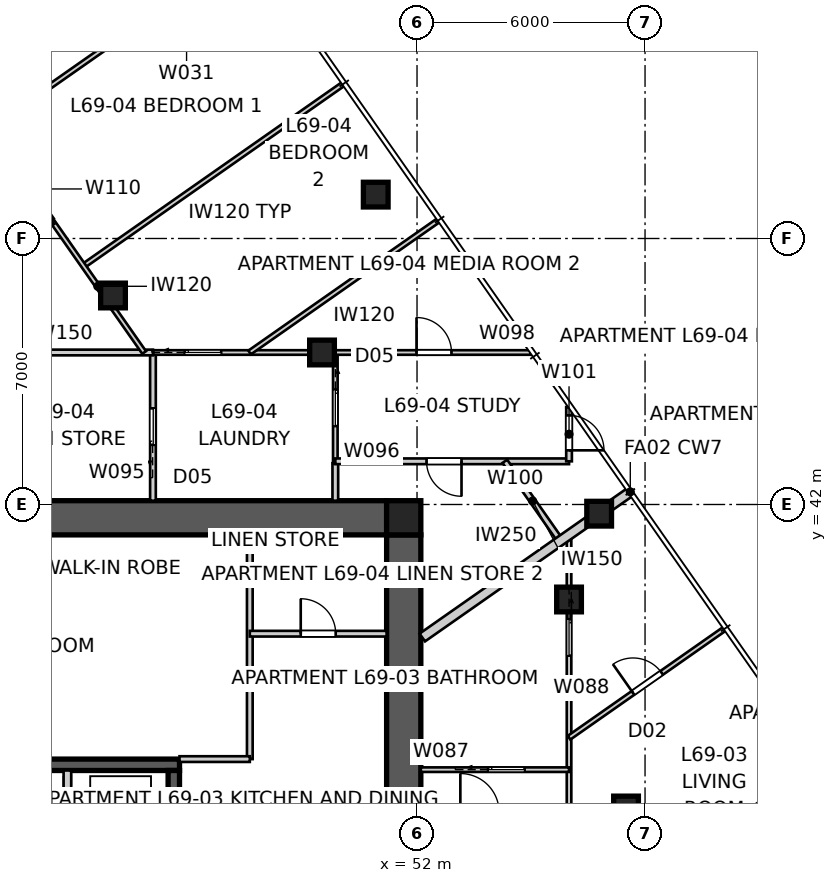
"""IFC4 building model, lengths in metres.
Left out: names, types, materials, properties, quantities, classifications, styles, units other than length and angle.
Written with IfcOpenShell. Run it as: python <this file> out.ifc"""

import sys

from ifc_helpers import new_model, si_unit, direction, frame, frame_2d, origin, origin_2d, place, context, subcontext, project, spatial, polyline, rectangle, outline, extrude, element, fill, save


model = new_model("IFC4")
c1 = context("Model", 3, precision=1e-05, world=origin(), true_north=direction((0.0, 1.0)))
c2 = subcontext(c1, "Body", "Model", "MODEL_VIEW")
j1 = project(units=[si_unit("LENGTHUNIT", "METRE"), si_unit("PLANEANGLEUNIT", "RADIAN")], contexts=[c1])
p1 = place(None, origin())
s1 = spatial("IfcSite", under=j1, at=p1, CompositionType="ELEMENT")
p2 = place(p1, origin())
s2 = spatial("IfcBuilding", under=s1, at=p2, CompositionType="ELEMENT")
p3 = place(p2, frame((0.0, 0.0, 250.6)))
s3 = spatial("IfcBuildingStorey", under=s2, at=p3, CompositionType="ELEMENT", Elevation=250.6)
p4 = place(p3, frame((28.8, 41.65, 0.0), z_axis=(0.0, 0.0, 1.0), x_axis=(1.0, 0.0, 0.0)))
e1 = element("IfcWall", 1, at=p4, inside=s3, PredefinedType="SHEAR", context=c2, shape_type="SweptSolid", body=[
    extrude(outline(polyline([(0.0, -0.45), (22.4, -0.45), (22.4, -0.025), (22.85, -0.025), (22.85, 0.025), (22.4, 0.025), (22.4, 0.45), (0.0, 0.45), (0.0, 0.025), (-0.45, 0.025), (-0.45, -0.025), (0.0, -0.025), (0.0, -0.45)])), origin(), (0.0, 0.0, 1.0), 3.4),
])
p5 = place(p3, frame((51.65, 18.8, 0.0), z_axis=(0.0, 0.0, 1.0), x_axis=(0.0, 1.0, 0.0)))
e2 = element("IfcWall", 2, at=p5, inside=s3, PredefinedType="SHEAR", context=c2, shape_type="SweptSolid", body=[
    extrude(outline(polyline([(0.0, -0.45), (22.4, -0.45), (22.4, -0.025), (22.85, -0.025), (22.85, 0.025), (22.4, 0.025), (22.4, 0.45), (0.0, 0.45), (0.0, 0.025), (-0.45, 0.025), (-0.45, -0.025), (0.0, -0.025), (0.0, -0.45)])), origin(), (0.0, 0.0, 1.0), 3.4),
])
p6 = place(p5, frame((11.14, 0.0, 0.0)))
e3 = element("IfcOpeningElement", 3, at=p6, cuts=e2, PredefinedType="OPENING", context=c2, shape_type="SweptSolid", body=[
    extrude(rectangle(XDim=1.02, YDim=2.4, at=frame_2d((0.51, 1.2))), frame((0.0, 0.46, 0.0), z_axis=(0.0, -1.0, 0.0), x_axis=(1.0, 0.0, 0.0)), (0.0, 0.0, 1.0), 0.92),
])
p7 = place(p3, frame((34.25, 35.15, 0.0), z_axis=(0.0, 0.0, 1.0), x_axis=(1.0, 0.0, 0.0)))
e4 = element("IfcWall", 4, at=p7, inside=s3, PredefinedType="SHEAR", context=c2, shape_type="SweptSolid", body=[
    extrude(rectangle(XDim=11.5, YDim=0.3, at=frame_2d((5.75, 0.0))), origin(), (0.0, 0.0, 1.0), 3.4),
])
p8 = place(p3, frame((42.8, 32.2, 0.0), z_axis=(0.0, 0.0, 1.0), x_axis=(0.0, 1.0, 0.0)))
e5 = element("IfcWall", 5, at=p8, inside=s3, PredefinedType="SOLIDWALL", context=c2, shape_type="SweptSolid", body=[
    extrude(rectangle(XDim=2.8, YDim=0.2, at=frame_2d((1.4, 0.0))), origin(), (0.0, 0.0, 1.0), 3.4),
])
p9 = place(p3, frame((45.6, 32.2, 0.0), z_axis=(0.0, 0.0, 1.0), x_axis=(0.0, 1.0, 0.0)))
e6 = element("IfcWall", 6, at=p9, inside=s3, PredefinedType="SHEAR", context=c2, shape_type="SweptSolid", body=[
    extrude(rectangle(XDim=2.8, YDim=0.3, at=frame_2d((1.4, 0.0))), origin(), (0.0, 0.0, 1.0), 3.4),
])
p10 = place(p3, frame((51.65, 41.65, 0.0), z_axis=(0.0, 0.0, 1.0), x_axis=(1.0, 0.0, 0.0)))
e7 = element("IfcColumn", 7, at=p10, inside=s3, PredefinedType="COLUMN", context=c2, shape_type="SweptSolid", body=[
    extrude(rectangle(XDim=0.9, YDim=0.9, at=origin_2d()), origin(), (0.0, 0.0, 1.0), 3.4),
])
for number, where, z_axis, x_axis in (
    (8, (56.793, 41.758, 0.0), (0.0, 0.0, 1.0), (1.0, 0.0, 0.0)),
    (9, (50.914, 50.155, 0.0), (0.0, 0.0, 1.0), (1.0, 0.0, 0.0)),
    (10, (57.5, 34.0, 0.0), (0.0, 0.0, 1.0), (1.0, 0.0, 0.0)),
    (11, (56.0, 39.5, 0.0), (0.0, 0.0, 1.0), (1.0, 0.0, 0.0)),
    (12, (49.5, 46.0, 0.0), (0.0, 0.0, 1.0), (1.0, 0.0, 0.0)),
    (13, (44.0, 47.5, 0.0), (0.0, 0.0, 1.0), (1.0, 0.0, 0.0)),
):
    element("IfcColumn", number, at=place(p3, frame(where, z_axis=z_axis, x_axis=x_axis)), inside=s3, PredefinedType="COLUMN", context=c2, shape_type="SweptSolid", body=[
        extrude(rectangle(XDim=0.65, YDim=0.65, at=origin_2d()), origin(), (0.0, 0.0, 1.0), 3.4),
    ])
p11 = place(p3, frame((57.612, 42.332, 0.0), z_axis=(0.0, 0.0, 1.0), x_axis=(-0.819161528122, -0.573562891796, 0.0)))
e14 = element("IfcWall", 14, at=p11, inside=s3, PredefinedType="PARTITIONING", context=c2, shape_type="SweptSolid", body=[
    extrude(rectangle(XDim=6.681, YDim=0.25, at=frame_2d((3.341, 0.0))), origin(), (0.0, 0.0, 1.0), 3.25),
])
p12 = place(p3, frame((62.631, 35.164, 0.0), z_axis=(0.0, 0.0, 1.0), x_axis=(-0.819152220062, -0.573576185321, 0.0)))
e15 = element("IfcWall", 15, at=p12, inside=s3, PredefinedType="PARTITIONING", context=c2, shape_type="SweptSolid", body=[
    extrude(rectangle(XDim=8.779, YDim=0.25, at=frame_2d((4.39, 0.0))), origin(), (0.0, 0.0, 1.0), 3.25),
])
p13 = place(p3, frame((47.6, 41.2, 0.0), z_axis=(0.0, 0.0, 1.0), x_axis=(0.0, -1.0, 0.0)))
e16 = element("IfcWall", 16, at=p13, inside=s3, PredefinedType="SOLIDWALL", context=c2, shape_type="SweptSolid", body=[
    extrude(rectangle(XDim=5.9, YDim=0.15, at=frame_2d((2.95, 0.0))), origin(), (0.0, 0.0, 1.0), 3.25),
])
p14 = place(p3, frame((47.6, 35.3, 0.0), z_axis=(0.0, 0.0, 1.0), x_axis=(-1.0, 0.0, 0.0)))
e17 = element("IfcWall", 17, at=p14, inside=s3, PredefinedType="SOLIDWALL", context=c2, shape_type="SweptSolid", body=[
    extrude(rectangle(XDim=1.85, YDim=0.15, at=frame_2d((0.925, 0.0))), origin(), (0.0, 0.0, 1.0), 3.25),
])
p15 = place(p3, frame((47.6, 38.6, 0.0), z_axis=(0.0, 0.0, 1.0), x_axis=(1.0, 0.0, 0.0)))
e18 = element("IfcWall", 18, at=p15, inside=s3, PredefinedType="SOLIDWALL", context=c2, shape_type="SweptSolid", body=[
    extrude(rectangle(XDim=3.6, YDim=0.15, at=frame_2d((1.8, 0.0))), origin(), (0.0, 0.0, 1.0), 3.25),
])
p16 = place(p15, frame((1.34, 0.0, 0.0)))
e19 = element("IfcOpeningElement", 19, at=p16, cuts=e18, PredefinedType="OPENING", context=c2, shape_type="SweptSolid", body=[
    extrude(rectangle(XDim=0.92, YDim=2.1, at=frame_2d((0.46, 1.05))), frame((0.0, 0.085, 0.0), z_axis=(0.0, -1.0, 0.0), x_axis=(1.0, 0.0, 0.0)), (0.0, 0.0, 1.0), 0.17),
])
p17 = place(p3, frame((56.0, 41.203, 0.0), z_axis=(0.0, 0.0, 1.0), x_axis=(0.0, -1.0, 0.0)))
e20 = element("IfcWall", 20, at=p17, inside=s3, PredefinedType="PARTITIONING", context=c2, shape_type="SweptSolid", body=[
    extrude(rectangle(XDim=26.198, YDim=0.12, at=frame_2d((13.099, 0.0))), origin(), (0.0, 0.0, 1.0), 2.55),
])
p18 = place(p17, frame((21.188, 0.0, 0.0)))
e21 = element("IfcOpeningElement", 21, at=p18, cuts=e20, PredefinedType="OPENING", context=c2, shape_type="SweptSolid", body=[
    extrude(rectangle(XDim=0.92, YDim=2.34, at=frame_2d((0.46, 1.17))), frame((0.0, 0.07, 0.0), z_axis=(0.0, -1.0, 0.0), x_axis=(1.0, 0.0, 0.0)), (0.0, 0.0, 1.0), 0.14),
])
p19 = place(p17, frame((17.537, 0.0, 0.0)))
e22 = element("IfcOpeningElement", 22, at=p19, cuts=e20, PredefinedType="OPENING", context=c2, shape_type="SweptSolid", body=[
    extrude(rectangle(XDim=0.92, YDim=2.34, at=frame_2d((0.46, 1.17))), frame((0.0, 0.07, 0.0), z_axis=(0.0, -1.0, 0.0), x_axis=(1.0, 0.0, 0.0)), (0.0, 0.0, 1.0), 0.14),
])
p20 = place(p17, frame((2.221, 0.0, 0.0)))
e23 = element("IfcOpeningElement", 23, at=p20, cuts=e20, PredefinedType="OPENING", context=c2, shape_type="SweptSolid", body=[
    extrude(rectangle(XDim=0.96, YDim=2.1, at=frame_2d((0.48, 1.05))), frame((0.0, 0.07, 0.0), z_axis=(0.0, -1.0, 0.0), x_axis=(1.0, 0.0, 0.0)), (0.0, 0.0, 1.0), 0.14),
])
p21 = place(p3, frame((52.1, 35.022, 0.0), z_axis=(0.0, 0.0, 1.0), x_axis=(1.0, 0.0, 0.0)))
e24 = element("IfcWall", 24, at=p21, inside=s3, PredefinedType="PARTITIONING", context=c2, shape_type="SweptSolid", body=[
    extrude(rectangle(XDim=3.9, YDim=0.12, at=frame_2d((1.95, 0.0))), origin(), (0.0, 0.0, 1.0), 3.25),
])
p22 = place(p21, frame((1.77, 0.0, 0.0)))
e25 = element("IfcOpeningElement", 25, at=p22, cuts=e24, PredefinedType="OPENING", context=c2, shape_type="SweptSolid", body=[
    extrude(rectangle(XDim=0.96, YDim=2.1, at=frame_2d((0.48, 1.05))), frame((0.0, 0.07, 0.0), z_axis=(0.0, -1.0, 0.0), x_axis=(1.0, 0.0, 0.0)), (0.0, 0.0, 1.0), 0.14),
])
p23 = place(p3, frame((56.0, 35.862, 0.0), z_axis=(0.0, 0.0, 1.0), x_axis=(0.819144584763, 0.57358708951, 0.0)))
e26 = element("IfcWall", 26, at=p23, inside=s3, PredefinedType="PARTITIONING", context=c2, shape_type="SweptSolid", body=[
    extrude(rectangle(XDim=4.991, YDim=0.12, at=frame_2d((2.496, 0.0))), origin(), (0.0, 0.0, 1.0), 3.25),
])
p24 = place(p23, frame((2.055, 0.0, 0.0)))
e27 = element("IfcOpeningElement", 27, at=p24, cuts=e26, PredefinedType="OPENING", context=c2, shape_type="SweptSolid", body=[
    extrude(rectangle(XDim=0.92, YDim=2.34, at=frame_2d((0.46, 1.17))), frame((0.0, 0.07, 0.0), z_axis=(0.0, -1.0, 0.0), x_axis=(1.0, 0.0, 0.0)), (0.0, 0.0, 1.0), 0.14),
])
p25 = place(p3, frame((45.051, 42.1, 0.0), z_axis=(0.0, 0.0, 1.0), x_axis=(0.0, 1.0, 0.0)))
e28 = element("IfcWall", 28, at=p25, inside=s3, PredefinedType="SOLIDWALL", context=c2, shape_type="SweptSolid", body=[
    extrude(rectangle(XDim=3.9, YDim=0.15, at=frame_2d((1.95, 0.0))), origin(), (0.0, 0.0, 1.0), 3.25),
])
p26 = place(p25, frame((1.47, 0.0, 0.0)))
e29 = element("IfcOpeningElement", 29, at=p26, cuts=e28, PredefinedType="OPENING", context=c2, shape_type="SweptSolid", body=[
    extrude(rectangle(XDim=0.96, YDim=2.1, at=frame_2d((0.48, 1.05))), frame((0.0, 0.085, 0.0), z_axis=(0.0, -1.0, 0.0), x_axis=(1.0, 0.0, 0.0)), (0.0, 0.0, 1.0), 0.17),
])
p27 = place(p3, frame((49.85, 46.0, 0.0), z_axis=(0.0, 0.0, 1.0), x_axis=(0.0, -1.0, 0.0)))
e30 = element("IfcWall", 30, at=p27, inside=s3, PredefinedType="PARTITIONING", context=c2, shape_type="SweptSolid", body=[
    extrude(rectangle(XDim=2.913, YDim=0.12, at=frame_2d((1.457, 0.0))), origin(), (0.0, 0.0, 1.0), 3.25),
])
p28 = place(p27, frame((0.977, 0.0, 0.0)))
e31 = element("IfcOpeningElement", 31, at=p28, cuts=e30, PredefinedType="OPENING", context=c2, shape_type="SweptSolid", body=[
    extrude(rectangle(XDim=0.96, YDim=2.1, at=frame_2d((0.48, 1.05))), frame((0.0, 0.07, 0.0), z_axis=(0.0, -1.0, 0.0), x_axis=(1.0, 0.0, 0.0)), (0.0, 0.0, 1.0), 0.14),
])
p29 = place(p3, frame((49.85, 43.087, 0.0), z_axis=(0.0, 0.0, 1.0), x_axis=(0.0, -1.0, 0.0)))
e32 = element("IfcWall", 32, at=p29, inside=s3, PredefinedType="SOLIDWALL", context=c2, shape_type="SweptSolid", body=[
    extrude(rectangle(XDim=0.987, YDim=0.15, at=frame_2d((0.493, 0.0))), origin(), (0.0, 0.0, 1.0), 3.25),
])
p30 = place(p3, frame((45.051, 46.0, 0.0), z_axis=(0.0, 0.0, 1.0), x_axis=(1.0, 0.0, 0.0)))
e33 = element("IfcWall", 33, at=p30, inside=s3, PredefinedType="PARTITIONING", context=c2, shape_type="SweptSolid", body=[
    extrude(rectangle(XDim=9.943, YDim=0.12, at=frame_2d((4.972, 0.0))), origin(), (0.0, 0.0, 1.0), 2.55),
])
p31 = place(p30, frame((0.835, 0.0, 0.0)))
e34 = element("IfcOpeningElement", 34, at=p31, cuts=e33, PredefinedType="OPENING", context=c2, shape_type="SweptSolid", body=[
    extrude(rectangle(XDim=0.96, YDim=2.1, at=frame_2d((0.48, 1.05))), frame((0.0, 0.07, 0.0), z_axis=(0.0, -1.0, 0.0), x_axis=(1.0, 0.0, 0.0)), (0.0, 0.0, 1.0), 0.14),
])
p32 = place(p30, frame((6.935, 0.0, 0.0)))
e35 = element("IfcOpeningElement", 35, at=p32, cuts=e33, PredefinedType="OPENING", context=c2, shape_type="SweptSolid", body=[
    extrude(rectangle(XDim=0.92, YDim=2.34, at=frame_2d((0.46, 1.17))), frame((0.0, 0.07, 0.0), z_axis=(0.0, -1.0, 0.0), x_axis=(1.0, 0.0, 0.0)), (0.0, 0.0, 1.0), 0.14),
])
p33 = place(p3, frame((40.253, 46.0, 0.0), z_axis=(0.0, 0.0, 1.0), x_axis=(1.0, 0.0, 0.0)))
e36 = element("IfcWall", 36, at=p33, inside=s3, PredefinedType="SOLIDWALL", context=c2, shape_type="SweptSolid", body=[
    extrude(rectangle(XDim=4.799, YDim=0.15, at=frame_2d((2.399, 0.0))), origin(), (0.0, 0.0, 1.0), 3.25),
])
p34 = place(p3, frame((56.0, 43.137, 0.0), z_axis=(0.0, 0.0, 1.0), x_axis=(-1.0, 0.0, 0.0)))
e37 = element("IfcWall", 37, at=p34, inside=s3, PredefinedType="SOLIDWALL", context=c2, shape_type="SweptSolid", body=[
    extrude(rectangle(XDim=6.15, YDim=0.15, at=frame_2d((3.075, 0.0))), origin(), (0.0, 0.0, 1.0), 3.25),
])
p35 = place(p34, frame((2.829, 0.0, 0.0)))
e38 = element("IfcOpeningElement", 38, at=p35, cuts=e37, PredefinedType="OPENING", context=c2, shape_type="SweptSolid", body=[
    extrude(rectangle(XDim=0.92, YDim=2.1, at=frame_2d((0.46, 1.05))), frame((0.0, 0.085, 0.0), z_axis=(0.0, -1.0, 0.0), x_axis=(1.0, 0.0, 0.0)), (0.0, 0.0, 1.0), 0.17),
])
p36 = place(p3, frame((56.0, 44.564, 0.0), z_axis=(0.0, 0.0, 1.0), x_axis=(0.0, -1.0, 0.0)))
e39 = element("IfcWall", 39, at=p36, inside=s3, PredefinedType="SOLIDWALL", context=c2, shape_type="SweptSolid", body=[
    extrude(rectangle(XDim=1.427, YDim=0.15, at=frame_2d((0.714, 0.0))), origin(), (0.0, 0.0, 1.0), 3.25),
])
p37 = place(p36, frame((0.219, 0.0, 0.0)))
e40 = element("IfcOpeningElement", 40, at=p37, cuts=e39, PredefinedType="OPENING", context=c2, shape_type="SweptSolid", body=[
    extrude(rectangle(XDim=0.92, YDim=2.34, at=frame_2d((0.46, 1.17))), frame((0.0, 0.085, 0.0), z_axis=(0.0, -1.0, 0.0), x_axis=(1.0, 0.0, 0.0)), (0.0, 0.0, 1.0), 0.17),
])
p38 = place(p3, frame((54.31, 43.137, 0.0), z_axis=(0.0, 0.0, 1.0), x_axis=(0.573513690046, -0.819195976144, 0.0)))
e41 = element("IfcWall", 41, at=p38, inside=s3, PredefinedType="SOLIDWALL", context=c2, shape_type="SweptSolid", body=[
    extrude(rectangle(XDim=2.553, YDim=0.15, at=frame_2d((1.276, 0.0))), origin(), (0.0, 0.0, 1.0), 3.25),
])
p39 = place(p3, frame((50.051, 53.06, 0.0), z_axis=(0.0, 0.0, 1.0), x_axis=(-0.819152099525, -0.573576357466, 0.0)))
e42 = element("IfcWall", 42, at=p39, inside=s3, PredefinedType="PARTITIONING", context=c2, shape_type="SweptSolid", body=[
    extrude(rectangle(XDim=8.335, YDim=0.12, at=frame_2d((4.167, 0.0))), origin(), (0.0, 0.0, 1.0), 3.25),
])
p40 = place(p3, frame((44.819, 46.0, 0.0), z_axis=(0.0, 0.0, 1.0), x_axis=(-0.573566368211, 0.819159093985, 0.0)))
e43 = element("IfcWall", 43, at=p40, inside=s3, PredefinedType="PARTITIONING", context=c2, shape_type="SweptSolid", body=[
    extrude(rectangle(XDim=4.253, YDim=0.12, at=frame_2d((2.126, 0.0))), origin(), (0.0, 0.0, 1.0), 3.25),
])
p41 = place(p3, frame((40.714, 51.863, 0.0), z_axis=(0.0, 0.0, 1.0), x_axis=(0.819139307094, 0.573594626521, 0.0)))
e44 = element("IfcWall", 44, at=p41, inside=s3, PredefinedType="PARTITIONING", context=c2, shape_type="SweptSolid", body=[
    extrude(rectangle(XDim=4.335, YDim=0.12, at=frame_2d((2.167, 0.0))), origin(), (0.0, 0.0, 1.0), 3.25),
])
p42 = place(p3, frame((42.38, 49.484, 0.0), z_axis=(0.0, 0.0, 1.0), x_axis=(-0.573585144111, 0.819145946981, 0.0)))
e45 = element("IfcWall", 45, at=p42, inside=s3, PredefinedType="SOLIDWALL", context=c2, shape_type="SweptSolid", body=[
    extrude(rectangle(XDim=2.001, YDim=0.15, at=frame_2d((1.001, 0.0))), origin(), (0.0, 0.0, 1.0), 3.25),
])
p43 = place(p42, frame((0.541, 0.0, 0.0)))
e46 = element("IfcOpeningElement", 46, at=p43, cuts=e45, PredefinedType="OPENING", context=c2, shape_type="SweptSolid", body=[
    extrude(rectangle(XDim=0.92, YDim=2.34, at=frame_2d((0.46, 1.17))), frame((0.0, 0.085, 0.0), z_axis=(0.0, -1.0, 0.0), x_axis=(1.0, 0.0, 0.0)), (0.0, 0.0, 1.0), 0.17),
])
p44 = place(p3, frame((52.56, 49.477, 0.0), z_axis=(0.0, 0.0, 1.0), x_axis=(-0.81915432861, -0.573573173989, 0.0)))
e47 = element("IfcWall", 47, at=p44, inside=s3, PredefinedType="PARTITIONING", context=c2, shape_type="SweptSolid", body=[
    extrude(rectangle(XDim=6.061, YDim=0.12, at=frame_2d((3.031, 0.0))), origin(), (0.0, 0.0, 1.0), 3.25),
])
p45 = place(p3, frame((38.825, 46.933, 0.0), z_axis=(0.0, 0.0, 1.0), x_axis=(0.81916112811, 0.573563463091, 0.0)))
e48 = element("IfcWall", 48, at=p45, inside=s3, PredefinedType="SOLIDWALL", context=c2, shape_type="SweptSolid", body=[
    extrude(rectangle(XDim=4.375, YDim=0.15, at=frame_2d((2.188, 0.0))), origin(), (0.0, 0.0, 1.0), 3.25),
])
p46 = place(p45, frame((1.728, 0.0, 0.0)))
e49 = element("IfcOpeningElement", 49, at=p46, cuts=e48, PredefinedType="OPENING", context=c2, shape_type="SweptSolid", body=[
    extrude(rectangle(XDim=0.92, YDim=2.34, at=frame_2d((0.46, 1.17))), frame((0.0, 0.085, 0.0), z_axis=(0.0, -1.0, 0.0), x_axis=(1.0, 0.0, 0.0)), (0.0, 0.0, 1.0), 0.17),
])
p47 = place(p16, origin())
e50 = element("IfcDoor", 50, at=p47, inside=s3, OperationType="SINGLE_SWING_LEFT", PredefinedType="DOOR", context=c2, shape_type="SweptSolid", body=[
    extrude(rectangle(XDim=0.92, YDim=2.1, at=frame_2d((0.46, 1.05))), frame((0.0, 0.025, 0.0), z_axis=(0.0, -1.0, 0.0), x_axis=(1.0, 0.0, 0.0)), (0.0, 0.0, 1.0), 0.05),
])
fill(e19, e50)
p48 = place(p22, origin())
e51 = element("IfcDoor", 51, at=p48, inside=s3, OperationType="SLIDING_TO_LEFT", PredefinedType="DOOR", context=c2, shape_type="SweptSolid", body=[
    extrude(rectangle(XDim=0.96, YDim=2.1, at=frame_2d((0.48, 1.05))), frame((0.0, 0.025, 0.0), z_axis=(0.0, -1.0, 0.0), x_axis=(1.0, 0.0, 0.0)), (0.0, 0.0, 1.0), 0.05),
])
fill(e25, e51)
p49 = place(p20, origin())
e52 = element("IfcDoor", 52, at=p49, inside=s3, OperationType="SLIDING_TO_LEFT", PredefinedType="DOOR", context=c2, shape_type="SweptSolid", body=[
    extrude(rectangle(XDim=0.96, YDim=2.1, at=frame_2d((0.48, 1.05))), frame((0.0, 0.025, 0.0), z_axis=(0.0, -1.0, 0.0), x_axis=(1.0, 0.0, 0.0)), (0.0, 0.0, 1.0), 0.05),
])
fill(e23, e52)
p50 = place(p26, origin())
e53 = element("IfcDoor", 53, at=p50, inside=s3, OperationType="SLIDING_TO_LEFT", PredefinedType="DOOR", context=c2, shape_type="SweptSolid", body=[
    extrude(rectangle(XDim=0.96, YDim=2.1, at=frame_2d((0.48, 1.05))), frame((0.0, 0.025, 0.0), z_axis=(0.0, -1.0, 0.0), x_axis=(1.0, 0.0, 0.0)), (0.0, 0.0, 1.0), 0.05),
])
fill(e29, e53)
p51 = place(p28, origin())
e54 = element("IfcDoor", 54, at=p51, inside=s3, OperationType="SLIDING_TO_LEFT", PredefinedType="DOOR", context=c2, shape_type="SweptSolid", body=[
    extrude(rectangle(XDim=0.96, YDim=2.1, at=frame_2d((0.48, 1.05))), frame((0.0, 0.025, 0.0), z_axis=(0.0, -1.0, 0.0), x_axis=(1.0, 0.0, 0.0)), (0.0, 0.0, 1.0), 0.05),
])
fill(e31, e54)
p52 = place(p31, origin())
e55 = element("IfcDoor", 55, at=p52, inside=s3, OperationType="SLIDING_TO_LEFT", PredefinedType="DOOR", context=c2, shape_type="SweptSolid", body=[
    extrude(rectangle(XDim=0.96, YDim=2.1, at=frame_2d((0.48, 1.05))), frame((0.0, 0.025, 0.0), z_axis=(0.0, -1.0, 0.0), x_axis=(1.0, 0.0, 0.0)), (0.0, 0.0, 1.0), 0.05),
])
fill(e34, e55)
p53 = place(p32, origin())
e56 = element("IfcDoor", 56, at=p53, inside=s3, OperationType="SINGLE_SWING_LEFT", PredefinedType="DOOR", context=c2, shape_type="SweptSolid", body=[
    extrude(rectangle(XDim=0.92, YDim=2.34, at=frame_2d((0.46, 1.17))), frame((0.0, 0.025, 0.0), z_axis=(0.0, -1.0, 0.0), x_axis=(1.0, 0.0, 0.0)), (0.0, 0.0, 1.0), 0.05),
])
fill(e35, e56)
p54 = place(p35, origin())
e57 = element("IfcDoor", 57, at=p54, inside=s3, OperationType="SINGLE_SWING_LEFT", PredefinedType="DOOR", context=c2, shape_type="SweptSolid", body=[
    extrude(rectangle(XDim=0.92, YDim=2.1, at=frame_2d((0.46, 1.05))), frame((0.0, 0.025, 0.0), z_axis=(0.0, -1.0, 0.0), x_axis=(1.0, 0.0, 0.0)), (0.0, 0.0, 1.0), 0.05),
])
fill(e38, e57)
p55 = place(p37, origin())
e58 = element("IfcDoor", 58, at=p55, inside=s3, OperationType="SINGLE_SWING_RIGHT", PredefinedType="DOOR", context=c2, shape_type="SweptSolid", body=[
    extrude(rectangle(XDim=0.92, YDim=2.34, at=frame_2d((0.46, 1.17))), frame((0.0, 0.025, 0.0), z_axis=(0.0, -1.0, 0.0), x_axis=(1.0, 0.0, 0.0)), (0.0, 0.0, 1.0), 0.05),
])
fill(e40, e58)
p56 = place(p24, origin())
e59 = element("IfcDoor", 59, at=p56, inside=s3, OperationType="SINGLE_SWING_LEFT", PredefinedType="DOOR", context=c2, shape_type="SweptSolid", body=[
    extrude(rectangle(XDim=0.92, YDim=2.34, at=frame_2d((0.46, 1.17))), frame((0.0, 0.025, 0.0), z_axis=(0.0, -1.0, 0.0), x_axis=(1.0, 0.0, 0.0)), (0.0, 0.0, 1.0), 0.05),
])
fill(e27, e59)
save(model, sys.argv[1])
